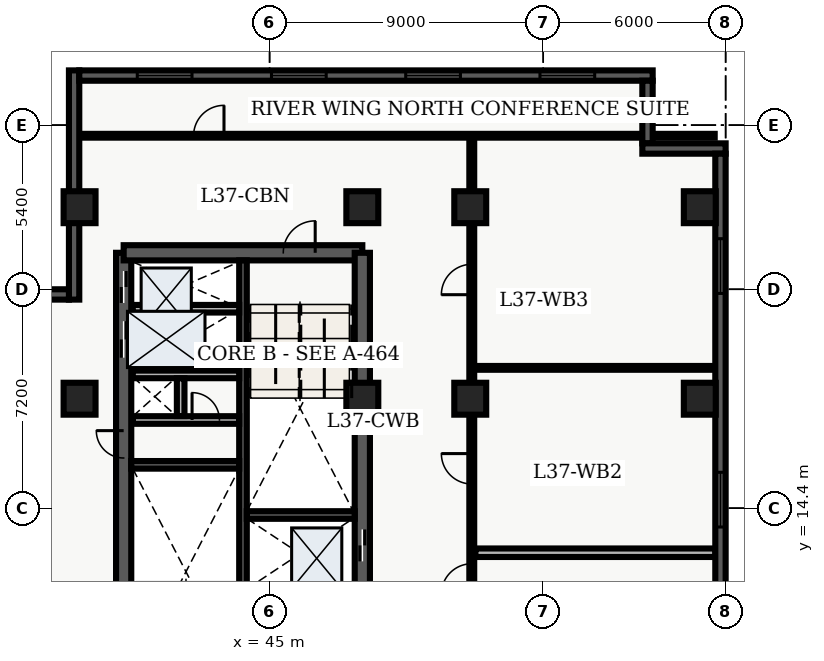
"""IFC4 building model, lengths in metres.
Left out: names, types, materials, properties, quantities, classifications, styles, units other than length and angle.
Written with IfcOpenShell. Run it as: python <this file> out.ifc"""

import sys

from ifc_helpers import new_model, entity, si_unit, converted_unit, direction, frame, origin_with_axes, origin_2d_with_axis, place, context, subcontext, project, spatial, polyline, rectangle, outline, extrude, element, fill, save


model = new_model("IFC4")
c1 = context("Model", 3, precision=1e-05, world=origin_with_axes(), true_north=direction((0.0, 1.0)))
c2 = subcontext(c1, "Body", "Model", "MODEL_VIEW")
j1 = project(units=[si_unit("LENGTHUNIT", "METRE"), converted_unit("PLANEANGLEUNIT", "DEGREE", entity("IfcPlaneAngleMeasure", 0.017), si_unit("PLANEANGLEUNIT", "RADIAN"), dimensions=[0, 0, 0, 0, 0, 0, 0])], contexts=[c1])
p1 = place(None, origin_with_axes())
s1 = spatial("IfcSite", under=j1, at=p1, CompositionType="ELEMENT")
p2 = place(p1, origin_with_axes())
s2 = spatial("IfcBuilding", under=s1, at=p2, CompositionType="ELEMENT")
p3 = place(p2, frame((0.0, 0.0, 152.4), z_axis=(0.0, 0.0, 1.0), x_axis=(1.0, 0.0, 0.0)))
s3 = spatial("IfcBuildingStorey", under=s2, at=p3, CompositionType="ELEMENT", Elevation=152.4)
p4 = place(p3, frame((40.2, 7.2, 0.0), z_axis=(0.0, 0.0, 1.0), x_axis=(0.0, 1.0, 0.0)))
e1 = element("IfcWall", 1, at=p4, inside=s3, PredefinedType="SHEAR", context=c2, shape_type="SweptSolid", body=[
    extrude(outline(polyline([(0.0, -0.25), (15.6, -0.25), (15.6, 0.25), (0.0, 0.25), (0.0, -0.25)])), origin_with_axes(), (0.0, 0.0, 1.0), 3.66),
])
p5 = place(p4, frame((14.475, 0.0, 0.0), z_axis=(0.0, 0.0, 1.0), x_axis=(1.0, 0.0, 0.0)))
e2 = element("IfcOpeningElement", 2, at=p5, cuts=e1, PredefinedType="OPENING", context=c2, shape_type="SweptSolid", body=[
    extrude(rectangle(XDim=1.05, YDim=0.52, at=origin_2d_with_axis()), origin_with_axes(), (0.0, 0.0, 1.0), 2.15),
])
p6 = place(p4, frame((12.75, 0.0, 0.0), z_axis=(0.0, 0.0, 1.0), x_axis=(1.0, 0.0, 0.0)))
e3 = element("IfcOpeningElement", 3, at=p6, cuts=e1, PredefinedType="OPENING", context=c2, shape_type="SweptSolid", body=[
    extrude(rectangle(XDim=1.2, YDim=0.52, at=origin_2d_with_axis()), origin_with_axes(), (0.0, 0.0, 1.0), 2.15),
])
p7 = place(p4, frame((9.3, 0.0, 0.0), z_axis=(0.0, 0.0, 1.0), x_axis=(1.0, 0.0, 0.0)))
e4 = element("IfcOpeningElement", 4, at=p7, cuts=e1, PredefinedType="OPENING", context=c2, shape_type="SweptSolid", body=[
    extrude(rectangle(XDim=0.9, YDim=0.52, at=origin_2d_with_axis()), origin_with_axes(), (0.0, 0.0, 1.0), 2.15),
])
p8 = place(p3, frame((40.2, 22.8, 0.0), z_axis=(0.0, 0.0, 1.0), x_axis=(1.0, 0.0, 0.0)))
e5 = element("IfcWall", 5, at=p8, inside=s3, PredefinedType="SHEAR", context=c2, shape_type="SweptSolid", body=[
    extrude(outline(polyline([(0.0, -0.25), (7.85, -0.25), (7.85, 0.25), (0.0, 0.25), (0.0, -0.25)])), origin_with_axes(), (0.0, 0.0, 1.0), 3.66),
])
p9 = place(p8, frame((5.775, 0.0, 0.0), z_axis=(0.0, 0.0, 1.0), x_axis=(1.0, 0.0, 0.0)))
e6 = element("IfcOpeningElement", 6, at=p9, cuts=e5, PredefinedType="OPENING", context=c2, shape_type="SweptSolid", body=[
    extrude(rectangle(XDim=1.05, YDim=0.52, at=origin_2d_with_axis()), origin_with_axes(), (0.0, 0.0, 1.0), 2.15),
])
p10 = place(p3, frame((48.05, 7.2, 0.0), z_axis=(0.0, 0.0, 1.0), x_axis=(0.0, 1.0, 0.0)))
e7 = element("IfcWall", 7, at=p10, inside=s3, PredefinedType="SHEAR", context=c2, shape_type="SweptSolid", body=[
    extrude(outline(polyline([(0.0, -0.25), (15.6, -0.25), (15.6, 0.25), (0.0, 0.25), (0.0, -0.25)])), origin_with_axes(), (0.0, 0.0, 1.0), 3.66),
])
p11 = place(p10, frame((5.975, 0.0, 0.0), z_axis=(0.0, 0.0, 1.0), x_axis=(1.0, 0.0, 0.0)))
e8 = element("IfcOpeningElement", 8, at=p11, cuts=e7, PredefinedType="OPENING", context=c2, shape_type="SweptSolid", body=[
    extrude(rectangle(XDim=1.05, YDim=0.52, at=origin_2d_with_axis()), origin_with_axes(), (0.0, 0.0, 1.0), 2.15),
])
p12 = place(p10, frame((2.725, 0.0, 0.0), z_axis=(0.0, 0.0, 1.0), x_axis=(1.0, 0.0, 0.0)))
e9 = element("IfcOpeningElement", 9, at=p12, cuts=e7, PredefinedType="OPENING", context=c2, shape_type="SweptSolid", body=[
    extrude(rectangle(XDim=0.95, YDim=0.52, at=origin_2d_with_axis()), origin_with_axes(), (0.0, 0.0, 1.0), 2.15),
])
p13 = place(p3, frame((44.125, 7.45, 0.0), z_axis=(0.0, 0.0, 1.0), x_axis=(0.0, 1.0, 0.0)))
e10 = element("IfcWall", 10, at=p13, inside=s3, PredefinedType="SHEAR", context=c2, shape_type="SweptSolid", body=[
    extrude(outline(polyline([(0.0, -0.125), (15.1, -0.125), (15.1, 0.125), (0.0, 0.125), (0.0, -0.125)])), origin_with_axes(), (0.0, 0.0, 1.0), 3.66),
])
for number, where, z_axis, x_axis in (
    (11, (40.45, 15.825, 0.0), (0.0, 0.0, 1.0), (1.0, 0.0, 0.0)),
    (12, (44.25, 14.175, 0.0), (0.0, 0.0, 1.0), (1.0, 0.0, 0.0)),
):
    element("IfcWall", number, at=place(p3, frame(where, z_axis=z_axis, x_axis=x_axis)), inside=s3, PredefinedType="SHEAR", context=c2, shape_type="SweptSolid", body=[
        extrude(outline(polyline([(0.0, -0.125), (3.55, -0.125), (3.55, 0.125), (0.0, 0.125), (0.0, -0.125)])), origin_with_axes(), (0.0, 0.0, 1.0), 3.66),
    ])
p14 = place(p3, frame((40.5, 17.3, 0.0), z_axis=(0.0, 0.0, 1.0), x_axis=(1.0, 0.0, 0.0)))
e13 = element("IfcWall", 13, at=p14, inside=s3, PredefinedType="SOLIDWALL", context=c2, shape_type="SweptSolid", body=[
    extrude(outline(polyline([(0.0, -0.125), (3.5, -0.125), (3.5, 0.125), (0.0, 0.125), (0.0, -0.125)])), origin_with_axes(), (0.0, 0.0, 1.0), 2.7),
])
p15 = place(p14, frame((2.4, 0.0, 0.0), z_axis=(0.0, 0.0, 1.0), x_axis=(1.0, 0.0, 0.0)))
e14 = element("IfcOpeningElement", 14, at=p15, cuts=e13, PredefinedType="OPENING", context=c2, shape_type="SweptSolid", body=[
    extrude(rectangle(XDim=0.9, YDim=0.27, at=origin_2d_with_axis()), origin_with_axes(), (0.0, 0.0, 1.0), 2.15),
])
p16 = place(p3, frame((40.5, 18.8, 0.0), z_axis=(0.0, 0.0, 1.0), x_axis=(1.0, 0.0, 0.0)))
e15 = element("IfcWall", 15, at=p16, inside=s3, PredefinedType="SOLIDWALL", context=c2, shape_type="SweptSolid", body=[
    extrude(outline(polyline([(0.0, -0.125), (3.5, -0.125), (3.5, 0.125), (0.0, 0.125), (0.0, -0.125)])), origin_with_axes(), (0.0, 0.0, 1.0), 2.7),
])
p17 = place(p3, frame((42.075, 17.43, 0.0), z_axis=(0.0, 0.0, 1.0), x_axis=(0.0, 1.0, 0.0)))
e16 = element("IfcWall", 16, at=p17, inside=s3, PredefinedType="SOLIDWALL", context=c2, shape_type="SweptSolid", body=[
    extrude(outline(polyline([(0.0, -0.125), (1.24, -0.125), (1.24, 0.125), (0.0, 0.125), (0.0, -0.125)])), origin_with_axes(), (0.0, 0.0, 1.0), 2.7),
])
for number, where, z_axis, x_axis in (
    (17, (38.75, 18.0, 0.0), (0.0, 0.0, 1.0), (1.0, 0.0, 0.0)),
    (18, (38.75, 24.3, 0.0), (0.0, 0.0, 1.0), (1.0, 0.0, 0.0)),
    (19, (48.05, 18.0, 0.0), (0.0, 0.0, 1.0), (1.0, 0.0, 0.0)),
    (20, (48.05, 24.3, 0.0), (0.0, 0.0, 1.0), (1.0, 0.0, 0.0)),
    (21, (51.6, 18.0, 0.0), (0.0, 0.0, 1.0), (1.0, 0.0, 0.0)),
    (22, (51.6, 24.3, 0.0), (0.0, 0.0, 1.0), (1.0, 0.0, 0.0)),
    (23, (59.15, 18.0, 0.0), (0.0, 0.0, 1.0), (1.0, 0.0, 0.0)),
    (24, (59.15, 24.3, 0.0), (0.0, 0.0, 1.0), (1.0, 0.0, 0.0)),
):
    element("IfcColumn", number, at=place(p3, frame(where, z_axis=z_axis, x_axis=x_axis)), inside=s3, PredefinedType="COLUMN", context=c2, shape_type="SweptSolid", body=[
        extrude(rectangle(XDim=1.05, YDim=1.05, at=origin_2d_with_axis()), origin_with_axes(), (0.0, 0.0, 1.0), 3.9),
    ])
p18 = place(p3, frame((40.5, 20.96, 0.0), z_axis=(0.0, 0.0, 1.0), x_axis=(1.0, 0.0, 0.0)))
e25 = element("IfcWall", 25, at=p18, inside=s3, PredefinedType="SOLIDWALL", context=c2, shape_type="SweptSolid", body=[
    extrude(outline(polyline([(0.0, -0.125), (3.5, -0.125), (3.5, 0.125), (0.0, 0.125), (0.0, -0.125)])), origin_with_axes(), (0.0, 0.0, 1.0), 2.7),
])
p19 = place(p3, frame((51.65, 7.85, 0.0), z_axis=(0.0, 0.0, 1.0), x_axis=(0.0, 1.0, 0.0)))
e26 = element("IfcWall", 26, at=p19, inside=s3, PredefinedType="PARTITIONING", context=c2, shape_type="SweptSolid", body=[
    extrude(outline(polyline([(0.0, -0.08), (18.8, -0.08), (18.8, 0.08), (0.0, 0.08), (0.0, -0.08)])), origin_with_axes(), (0.0, 0.0, 1.0), 2.7),
])
p20 = place(p19, frame((4.222, 0.0, 0.0), z_axis=(0.0, 0.0, 1.0), x_axis=(1.0, 0.0, 0.0)))
e27 = element("IfcOpeningElement", 27, at=p20, cuts=e26, PredefinedType="OPENING", context=c2, shape_type="SweptSolid", body=[
    extrude(rectangle(XDim=1.0, YDim=0.18, at=origin_2d_with_axis()), origin_with_axes(), (0.0, 0.0, 1.0), 2.15),
])
p21 = place(p19, frame((7.845, 0.0, 0.0), z_axis=(0.0, 0.0, 1.0), x_axis=(1.0, 0.0, 0.0)))
e28 = element("IfcOpeningElement", 28, at=p21, cuts=e26, PredefinedType="OPENING", context=c2, shape_type="SweptSolid", body=[
    extrude(rectangle(XDim=1.0, YDim=0.18, at=origin_2d_with_axis()), origin_with_axes(), (0.0, 0.0, 1.0), 2.15),
])
p22 = place(p19, frame((14.072, 0.0, 0.0), z_axis=(0.0, 0.0, 1.0), x_axis=(1.0, 0.0, 0.0)))
e29 = element("IfcOpeningElement", 29, at=p22, cuts=e26, PredefinedType="OPENING", context=c2, shape_type="SweptSolid", body=[
    extrude(rectangle(XDim=1.0, YDim=0.18, at=origin_2d_with_axis()), origin_with_axes(), (0.0, 0.0, 1.0), 2.15),
])
p23 = place(p3, frame((38.735, 26.65, 0.0), z_axis=(0.0, 0.0, 1.0), x_axis=(1.0, 0.0, 0.0)))
e30 = element("IfcWall", 30, at=p23, inside=s3, PredefinedType="PARTITIONING", context=c2, shape_type="SweptSolid", body=[
    extrude(outline(polyline([(0.0, -0.062), (20.905, -0.062), (20.905, 0.062), (0.0, 0.062), (0.0, -0.062)])), origin_with_axes(), (0.0, 0.0, 1.0), 2.7),
])
p24 = place(p23, frame((4.265, 0.0, 0.0), z_axis=(0.0, 0.0, 1.0), x_axis=(1.0, 0.0, 0.0)))
e31 = element("IfcOpeningElement", 31, at=p24, cuts=e30, PredefinedType="OPENING", context=c2, shape_type="SweptSolid", body=[
    extrude(rectangle(XDim=1.0, YDim=0.145, at=origin_2d_with_axis()), origin_with_axes(), (0.0, 0.0, 1.0), 2.15),
])
p25 = place(p3, frame((51.77, 12.934, 0.0), z_axis=(0.0, 0.0, 1.0), x_axis=(1.0, 0.0, 0.0)))
e32 = element("IfcWall", 32, at=p25, inside=s3, PredefinedType="PARTITIONING", context=c2, shape_type="SweptSolid", body=[
    extrude(outline(polyline([(0.0, -0.14), (7.895, -0.14), (7.895, 0.14), (0.0, 0.14), (0.0, -0.14)])), origin_with_axes(), (0.0, 0.0, 1.0), 2.7),
])
p26 = place(p3, frame((51.77, 19.015, 0.0), z_axis=(0.0, 0.0, 1.0), x_axis=(1.0, 0.0, 0.0)))
e33 = element("IfcWall", 33, at=p26, inside=s3, PredefinedType="PARTITIONING", context=c2, shape_type="SweptSolid", body=[
    extrude(outline(polyline([(0.0, -0.062), (7.895, -0.062), (7.895, 0.062), (0.0, 0.062), (0.0, -0.062)])), origin_with_axes(), (0.0, 0.0, 1.0), 2.7),
])
p27 = place(p3, frame((38.57, 21.26, 0.0), z_axis=(0.0, 0.0, 1.0), x_axis=(0.0, 1.0, 0.0)))
e34 = element("IfcWall", 34, at=p27, inside=s3, PredefinedType="SOLIDWALL", context=c2, shape_type="SweptSolid", body=[
    extrude(outline(polyline([(0.0, -0.17), (7.54, -0.17), (7.54, 0.17), (0.0, 0.17), (0.0, -0.17)])), origin_with_axes(), (0.0, 0.0, 1.0), 3.66),
])
p28 = place(p3, frame((38.74, 28.63, 0.0), z_axis=(0.0, 0.0, 1.0), x_axis=(1.0, 0.0, 0.0)))
e35 = element("IfcWall", 35, at=p28, inside=s3, PredefinedType="SOLIDWALL", context=c2, shape_type="SweptSolid", body=[
    extrude(outline(polyline([(0.0, -0.17), (18.86, -0.17), (18.86, 0.17), (0.0, 0.17), (0.0, -0.17)])), origin_with_axes(), (0.0, 0.0, 1.0), 3.66),
])
p29 = place(p28, frame((2.808, 0.0, 0.45), z_axis=(0.0, 0.0, 1.0), x_axis=(1.0, 0.0, 0.0)))
e36 = element("IfcOpeningElement", 36, at=p29, cuts=e35, PredefinedType="OPENING", context=c2, shape_type="SweptSolid", body=[
    extrude(rectangle(XDim=1.8, YDim=0.36, at=origin_2d_with_axis()), origin_with_axes(), (0.0, 0.0, 1.0), 2.1),
])
p30 = place(p28, frame((7.222, 0.0, 0.45), z_axis=(0.0, 0.0, 1.0), x_axis=(1.0, 0.0, 0.0)))
e37 = element("IfcOpeningElement", 37, at=p30, cuts=e35, PredefinedType="OPENING", context=c2, shape_type="SweptSolid", body=[
    extrude(rectangle(XDim=1.8, YDim=0.36, at=origin_2d_with_axis()), origin_with_axes(), (0.0, 0.0, 1.0), 2.1),
])
p31 = place(p28, frame((11.637, 0.0, 0.45), z_axis=(0.0, 0.0, 1.0), x_axis=(1.0, 0.0, 0.0)))
e38 = element("IfcOpeningElement", 38, at=p31, cuts=e35, PredefinedType="OPENING", context=c2, shape_type="SweptSolid", body=[
    extrude(rectangle(XDim=1.8, YDim=0.36, at=origin_2d_with_axis()), origin_with_axes(), (0.0, 0.0, 1.0), 2.1),
])
p32 = place(p28, frame((16.053, 0.0, 0.45), z_axis=(0.0, 0.0, 1.0), x_axis=(1.0, 0.0, 0.0)))
e39 = element("IfcOpeningElement", 39, at=p32, cuts=e35, PredefinedType="OPENING", context=c2, shape_type="SweptSolid", body=[
    extrude(rectangle(XDim=1.8, YDim=0.36, at=origin_2d_with_axis()), origin_with_axes(), (0.0, 0.0, 1.0), 2.1),
])
p33 = place(p3, frame((57.43, 28.46, 0.0), z_axis=(0.0, 0.0, 1.0), x_axis=(0.0, -1.0, 0.0)))
e40 = element("IfcWall", 40, at=p33, inside=s3, PredefinedType="SOLIDWALL", context=c2, shape_type="SweptSolid", body=[
    extrude(outline(polyline([(0.0, -0.17), (2.06, -0.17), (2.06, 0.17), (0.0, 0.17), (0.0, -0.17)])), origin_with_axes(), (0.0, 0.0, 1.0), 3.66),
])
p34 = place(p3, frame((57.26, 26.23, 0.0), z_axis=(0.0, 0.0, 1.0), x_axis=(1.0, 0.0, 0.0)))
e41 = element("IfcWall", 41, at=p34, inside=s3, PredefinedType="SOLIDWALL", context=c2, shape_type="SweptSolid", body=[
    extrude(outline(polyline([(0.0, -0.17), (2.74, -0.17), (2.74, 0.17), (0.0, 0.17), (0.0, -0.17)])), origin_with_axes(), (0.0, 0.0, 1.0), 3.66),
])
p35 = place(p3, frame((59.83, 26.06, 0.0), z_axis=(0.0, 0.0, 1.0), x_axis=(0.0, -1.0, 0.0)))
e42 = element("IfcWall", 42, at=p35, inside=s3, PredefinedType="SOLIDWALL", context=c2, shape_type="SweptSolid", body=[
    extrude(outline(polyline([(0.0, -0.17), (23.66, -0.17), (23.66, 0.17), (0.0, 0.17), (0.0, -0.17)])), origin_with_axes(), (0.0, 0.0, 1.0), 3.66),
])
p36 = place(p35, frame((3.696, 0.0, 0.45), z_axis=(0.0, 0.0, 1.0), x_axis=(1.0, 0.0, 0.0)))
e43 = element("IfcOpeningElement", 43, at=p36, cuts=e42, PredefinedType="OPENING", context=c2, shape_type="SweptSolid", body=[
    extrude(rectangle(XDim=1.8, YDim=0.36, at=origin_2d_with_axis()), origin_with_axes(), (0.0, 0.0, 1.0), 2.1),
])
p37 = place(p35, frame((11.38, 0.0, 0.45), z_axis=(0.0, 0.0, 1.0), x_axis=(1.0, 0.0, 0.0)))
e44 = element("IfcOpeningElement", 44, at=p37, cuts=e42, PredefinedType="OPENING", context=c2, shape_type="SweptSolid", body=[
    extrude(rectangle(XDim=1.8, YDim=0.36, at=origin_2d_with_axis()), origin_with_axes(), (0.0, 0.0, 1.0), 2.1),
])
p38 = place(p35, frame((20.364, 0.0, 0.45), z_axis=(0.0, 0.0, 1.0), x_axis=(1.0, 0.0, 0.0)))
e45 = element("IfcOpeningElement", 45, at=p38, cuts=e42, PredefinedType="OPENING", context=c2, shape_type="SweptSolid", body=[
    extrude(rectangle(XDim=1.8, YDim=0.36, at=origin_2d_with_axis()), origin_with_axes(), (0.0, 0.0, 1.0), 2.1),
])
p39 = place(p3, frame((22.387, 21.43, 0.0), z_axis=(0.0, 0.0, 1.0), x_axis=(1.0, 0.0, 0.0)))
e46 = element("IfcWall", 46, at=p39, inside=s3, PredefinedType="SOLIDWALL", context=c2, shape_type="SweptSolid", body=[
    extrude(outline(polyline([(0.0, -0.17), (16.013, -0.17), (16.013, 0.17), (0.0, 0.17), (0.0, -0.17)])), origin_with_axes(), (0.0, 0.0, 1.0), 3.66),
])
p40 = place(p39, frame((3.069, 0.0, 0.45), z_axis=(0.0, 0.0, 1.0), x_axis=(1.0, 0.0, 0.0)))
e47 = element("IfcOpeningElement", 47, at=p40, cuts=e46, PredefinedType="OPENING", context=c2, shape_type="SweptSolid", body=[
    extrude(rectangle(XDim=1.8, YDim=0.36, at=origin_2d_with_axis()), origin_with_axes(), (0.0, 0.0, 1.0), 2.1),
])
p41 = place(p39, frame((8.006, 0.0, 0.45), z_axis=(0.0, 0.0, 1.0), x_axis=(1.0, 0.0, 0.0)))
e48 = element("IfcOpeningElement", 48, at=p41, cuts=e46, PredefinedType="OPENING", context=c2, shape_type="SweptSolid", body=[
    extrude(rectangle(XDim=1.8, YDim=0.36, at=origin_2d_with_axis()), origin_with_axes(), (0.0, 0.0, 1.0), 2.1),
])
p42 = place(p39, frame((12.494, 0.0, 0.45), z_axis=(0.0, 0.0, 1.0), x_axis=(1.0, 0.0, 0.0)))
e49 = element("IfcOpeningElement", 49, at=p42, cuts=e46, PredefinedType="OPENING", context=c2, shape_type="SweptSolid", body=[
    extrude(rectangle(XDim=1.8, YDim=0.36, at=origin_2d_with_axis()), origin_with_axes(), (0.0, 0.0, 1.0), 2.1),
])
p43 = place(p10, frame((5.975, 0.0, 0.0), z_axis=(0.0, 0.0, 1.0), x_axis=(1.0, 0.0, 0.0)))
e50 = element("IfcDoor", 50, at=p43, inside=s3, OperationType="SLIDING_TO_LEFT", PredefinedType="DOOR", context=c2, shape_type="SweptSolid", body=[
    extrude(rectangle(XDim=1.05, YDim=0.09, at=origin_2d_with_axis()), origin_with_axes(), (0.0, 0.0, 1.0), 2.15),
])
fill(e8, e50)
p44 = place(p4, frame((14.475, 0.0, 0.0), z_axis=(0.0, 0.0, 1.0), x_axis=(1.0, 0.0, 0.0)))
e51 = element("IfcDoor", 51, at=p44, inside=s3, OperationType="SLIDING_TO_RIGHT", PredefinedType="DOOR", context=c2, shape_type="SweptSolid", body=[
    extrude(rectangle(XDim=1.05, YDim=0.09, at=origin_2d_with_axis()), origin_with_axes(), (0.0, 0.0, 1.0), 2.15),
])
fill(e2, e51)
p45 = place(p4, frame((12.75, 0.0, 0.0), z_axis=(0.0, 0.0, 1.0), x_axis=(1.0, 0.0, 0.0)))
e52 = element("IfcDoor", 52, at=p45, inside=s3, OperationType="DOUBLE_DOOR_SLIDING", PredefinedType="DOOR", context=c2, shape_type="SweptSolid", body=[
    extrude(rectangle(XDim=1.2, YDim=0.09, at=origin_2d_with_axis()), origin_with_axes(), (0.0, 0.0, 1.0), 2.15),
])
fill(e3, e52)
p46 = place(p4, frame((9.3, 0.0, 0.0), z_axis=(0.0, 0.0, 1.0), x_axis=(1.0, 0.0, 0.0)))
e53 = element("IfcDoor", 53, at=p46, inside=s3, OperationType="SINGLE_SWING_RIGHT", PredefinedType="DOOR", context=c2, shape_type="SweptSolid", body=[
    extrude(rectangle(XDim=0.9, YDim=0.09, at=origin_2d_with_axis()), origin_with_axes(), (0.0, 0.0, 1.0), 2.15),
])
fill(e4, e53)
p47 = place(p14, frame((2.4, 0.0, 0.0), z_axis=(0.0, 0.0, 1.0), x_axis=(1.0, 0.0, 0.0)))
e54 = element("IfcDoor", 54, at=p47, inside=s3, OperationType="SINGLE_SWING_LEFT", PredefinedType="DOOR", context=c2, shape_type="SweptSolid", body=[
    extrude(rectangle(XDim=0.9, YDim=0.09, at=origin_2d_with_axis()), origin_with_axes(), (0.0, 0.0, 1.0), 2.15),
])
fill(e14, e54)
p48 = place(p8, frame((5.775, 0.0, 0.0), z_axis=(0.0, 0.0, 1.0), x_axis=(1.0, 0.0, 0.0)))
e55 = element("IfcDoor", 55, at=p48, inside=s3, OperationType="SINGLE_SWING_RIGHT", PredefinedType="DOOR", context=c2, shape_type="SweptSolid", body=[
    extrude(rectangle(XDim=1.05, YDim=0.09, at=origin_2d_with_axis()), origin_with_axes(), (0.0, 0.0, 1.0), 2.15),
])
fill(e6, e55)
p49 = place(p23, frame((4.265, 0.0, 0.0), z_axis=(0.0, 0.0, 1.0), x_axis=(1.0, 0.0, 0.0)))
e56 = element("IfcDoor", 56, at=p49, inside=s3, OperationType="SINGLE_SWING_RIGHT", PredefinedType="DOOR", context=c2, shape_type="SweptSolid", body=[
    extrude(rectangle(XDim=1.0, YDim=0.075, at=origin_2d_with_axis()), origin_with_axes(), (0.0, 0.0, 1.0), 2.15),
])
fill(e31, e56)
p50 = place(p19, frame((4.222, 0.0, 0.0), z_axis=(0.0, 0.0, 1.0), x_axis=(1.0, 0.0, 0.0)))
e57 = element("IfcDoor", 57, at=p50, inside=s3, OperationType="SINGLE_SWING_LEFT", PredefinedType="DOOR", context=c2, shape_type="SweptSolid", body=[
    extrude(rectangle(XDim=1.0, YDim=0.09, at=origin_2d_with_axis()), origin_with_axes(), (0.0, 0.0, 1.0), 2.15),
])
fill(e27, e57)
p51 = place(p19, frame((7.845, 0.0, 0.0), z_axis=(0.0, 0.0, 1.0), x_axis=(1.0, 0.0, 0.0)))
e58 = element("IfcDoor", 58, at=p51, inside=s3, OperationType="SINGLE_SWING_RIGHT", PredefinedType="DOOR", context=c2, shape_type="SweptSolid", body=[
    extrude(rectangle(XDim=1.0, YDim=0.09, at=origin_2d_with_axis()), origin_with_axes(), (0.0, 0.0, 1.0), 2.15),
])
fill(e28, e58)
p52 = place(p19, frame((14.072, 0.0, 0.0), z_axis=(0.0, 0.0, 1.0), x_axis=(1.0, 0.0, 0.0)))
e59 = element("IfcDoor", 59, at=p52, inside=s3, OperationType="SINGLE_SWING_LEFT", PredefinedType="DOOR", context=c2, shape_type="SweptSolid", body=[
    extrude(rectangle(XDim=1.0, YDim=0.09, at=origin_2d_with_axis()), origin_with_axes(), (0.0, 0.0, 1.0), 2.15),
])
fill(e29, e59)
p53 = place(p28, frame((2.808, 0.0, 0.45), z_axis=(0.0, 0.0, 1.0), x_axis=(1.0, 0.0, 0.0)))
e60 = element("IfcWindow", 60, at=p53, inside=s3, PredefinedType="WINDOW", context=c2, shape_type="SweptSolid", body=[
    extrude(rectangle(XDim=1.8, YDim=0.09, at=origin_2d_with_axis()), origin_with_axes(), (0.0, 0.0, 1.0), 2.1),
])
fill(e36, e60)
p54 = place(p28, frame((7.222, 0.0, 0.45), z_axis=(0.0, 0.0, 1.0), x_axis=(1.0, 0.0, 0.0)))
e61 = element("IfcWindow", 61, at=p54, inside=s3, PredefinedType="WINDOW", context=c2, shape_type="SweptSolid", body=[
    extrude(rectangle(XDim=1.8, YDim=0.09, at=origin_2d_with_axis()), origin_with_axes(), (0.0, 0.0, 1.0), 2.1),
])
fill(e37, e61)
p55 = place(p28, frame((11.637, 0.0, 0.45), z_axis=(0.0, 0.0, 1.0), x_axis=(1.0, 0.0, 0.0)))
e62 = element("IfcWindow", 62, at=p55, inside=s3, PredefinedType="WINDOW", context=c2, shape_type="SweptSolid", body=[
    extrude(rectangle(XDim=1.8, YDim=0.09, at=origin_2d_with_axis()), origin_with_axes(), (0.0, 0.0, 1.0), 2.1),
])
fill(e38, e62)
p56 = place(p28, frame((16.053, 0.0, 0.45), z_axis=(0.0, 0.0, 1.0), x_axis=(1.0, 0.0, 0.0)))
e63 = element("IfcWindow", 63, at=p56, inside=s3, PredefinedType="WINDOW", context=c2, shape_type="SweptSolid", body=[
    extrude(rectangle(XDim=1.8, YDim=0.09, at=origin_2d_with_axis()), origin_with_axes(), (0.0, 0.0, 1.0), 2.1),
])
fill(e39, e63)
p57 = place(p35, frame((3.696, 0.0, 0.45), z_axis=(0.0, 0.0, 1.0), x_axis=(1.0, 0.0, 0.0)))
e64 = element("IfcWindow", 64, at=p57, inside=s3, PredefinedType="WINDOW", context=c2, shape_type="SweptSolid", body=[
    extrude(rectangle(XDim=1.8, YDim=0.09, at=origin_2d_with_axis()), origin_with_axes(), (0.0, 0.0, 1.0), 2.1),
])
fill(e43, e64)
p58 = place(p35, frame((11.38, 0.0, 0.45), z_axis=(0.0, 0.0, 1.0), x_axis=(1.0, 0.0, 0.0)))
e65 = element("IfcWindow", 65, at=p58, inside=s3, PredefinedType="WINDOW", context=c2, shape_type="SweptSolid", body=[
    extrude(rectangle(XDim=1.8, YDim=0.09, at=origin_2d_with_axis()), origin_with_axes(), (0.0, 0.0, 1.0), 2.1),
])
fill(e44, e65)
save(model, sys.argv[1])
